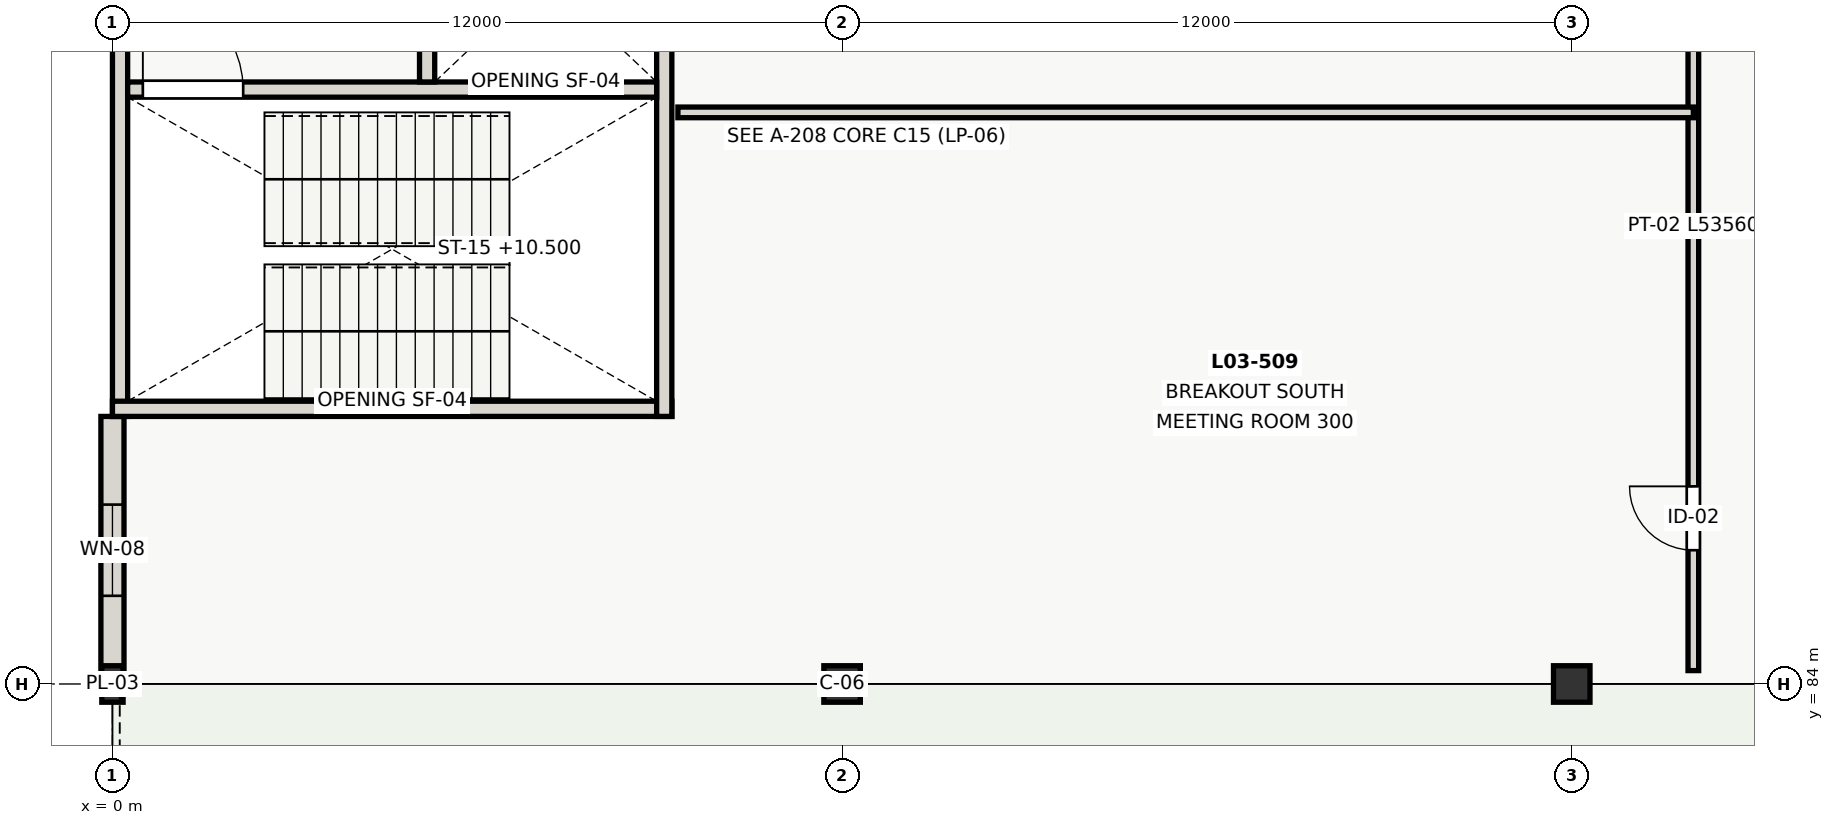
"""IFC4 building model, lengths in metres.
Left out: names, types, materials, properties, quantities, classifications, styles, units other than length and angle.
Written with IfcOpenShell. Run it as: python <this file> out.ifc"""

import sys

from ifc_helpers import new_model, si_unit, direction, frame, frame_2d, origin, origin_2d, place, context, subcontext, project, spatial, rectangle, extrude, element, fill, save


model = new_model("IFC4")
c1 = context("Model", 3, precision=1e-05, world=origin(), true_north=direction((0.0, 1.0)))
c2 = subcontext(c1, "Body", "Model", "MODEL_VIEW")
j1 = project(units=[si_unit("LENGTHUNIT", "METRE"), si_unit("PLANEANGLEUNIT", "RADIAN")], contexts=[c1])
p1 = place(None, origin())
s1 = spatial("IfcSite", under=j1, at=p1, CompositionType="ELEMENT")
p2 = place(p1, origin())
s2 = spatial("IfcBuilding", under=s1, at=p2, CompositionType="ELEMENT")
p3 = place(p2, frame((0.0, 0.0, 8.4)))
s3 = spatial("IfcBuildingStorey", under=s2, at=p3, CompositionType="ELEMENT", Elevation=8.4)
p4 = place(p3, frame((0.0, 84.0, 0.0), z_axis=(0.0, 0.0, 1.0), x_axis=(1.0, 0.0, 0.0)))
e1 = element("IfcColumn", 1, at=p4, inside=s3, PredefinedType="PILASTER", context=c2, shape_type="SweptSolid", body=[
    extrude(rectangle(XDim=0.35, YDim=0.6, at=origin_2d()), origin(), (0.0, 0.0, 1.0), 4.2),
])
for number, where, z_axis, x_axis in (
    (2, (12.0, 84.0, 0.0), (0.0, 0.0, 1.0), (1.0, 0.0, 0.0)),
    (3, (24.0, 84.0, 0.0), (0.0, 0.0, 1.0), (1.0, 0.0, 0.0)),
):
    element("IfcColumn", number, at=place(p3, frame(where, z_axis=z_axis, x_axis=x_axis)), inside=s3, PredefinedType="COLUMN", context=c2, shape_type="SweptSolid", body=[
        extrude(rectangle(XDim=0.6, YDim=0.6, at=origin_2d()), origin(), (0.0, 0.0, 1.0), 4.2),
    ])
p5 = place(p3, frame((0.0, 84.0, 0.0), z_axis=(0.0, 0.0, 1.0), x_axis=(0.0, 1.0, 0.0)))
e4 = element("IfcWall", 4, at=p5, inside=s3, PredefinedType="SOLIDWALL", context=c2, shape_type="SweptSolid", body=[
    extrude(rectangle(XDim=4.4, YDim=0.38, at=frame_2d((2.2, 0.0))), origin(), (0.0, 0.0, 1.0), 3.36),
])
p6 = place(p5, frame((1.45, 0.0, 0.9)))
e5 = element("IfcOpeningElement", 5, at=p6, cuts=e4, PredefinedType="OPENING", context=c2, shape_type="SweptSolid", body=[
    extrude(rectangle(XDim=1.5, YDim=1.95, at=frame_2d((0.75, 0.975))), frame((0.0, 0.2, 0.0), z_axis=(0.0, -1.0, 0.0), x_axis=(1.0, 0.0, 0.0)), (0.0, 0.0, 1.0), 0.4),
])
p7 = place(p3, frame((0.125, 88.4, 0.0), z_axis=(0.0, 0.0, 1.0), x_axis=(0.0, 1.0, 0.0)))
e6 = element("IfcWall", 6, at=p7, inside=s3, PredefinedType="SHEAR", context=c2, shape_type="SweptSolid", body=[
    extrude(rectangle(XDim=9.2, YDim=0.25, at=frame_2d((4.6, 0.0))), origin(), (0.0, 0.0, 1.0), 4.2),
])
p8 = place(p3, frame((0.0, 88.525, 0.0), z_axis=(0.0, 0.0, 1.0), x_axis=(1.0, 0.0, 0.0)))
e7 = element("IfcWall", 7, at=p8, inside=s3, PredefinedType="SHEAR", context=c2, shape_type="SweptSolid", body=[
    extrude(rectangle(XDim=9.2, YDim=0.25, at=frame_2d((4.6, 0.0))), origin(), (0.0, 0.0, 1.0), 4.2),
])
p9 = place(p3, frame((9.075, 88.4, 0.0), z_axis=(0.0, 0.0, 1.0), x_axis=(0.0, 1.0, 0.0)))
e8 = element("IfcWall", 8, at=p9, inside=s3, PredefinedType="SHEAR", context=c2, shape_type="SweptSolid", body=[
    extrude(rectangle(XDim=9.2, YDim=0.25, at=frame_2d((4.6, 0.0))), origin(), (0.0, 0.0, 1.0), 4.2),
])
p10 = place(p3, frame((0.25, 93.775, 0.0), z_axis=(0.0, 0.0, 1.0), x_axis=(1.0, 0.0, 0.0)))
e9 = element("IfcWall", 9, at=p10, inside=s3, PredefinedType="SHEAR", context=c2, shape_type="SweptSolid", body=[
    extrude(rectangle(XDim=8.7, YDim=0.25, at=frame_2d((4.35, 0.0))), origin(), (0.0, 0.0, 1.0), 4.2),
])
p11 = place(p10, frame((0.25, 0.0, 0.0)))
e10 = element("IfcOpeningElement", 10, at=p11, cuts=e9, PredefinedType="OPENING", context=c2, shape_type="SweptSolid", body=[
    extrude(rectangle(XDim=1.65, YDim=2.1, at=frame_2d((0.825, 1.05))), frame((0.0, 0.135, 0.0), z_axis=(0.0, -1.0, 0.0), x_axis=(1.0, 0.0, 0.0)), (0.0, 0.0, 1.0), 0.27),
])
p12 = place(p3, frame((5.175, 93.9, 0.0), z_axis=(0.0, 0.0, 1.0), x_axis=(0.0, 1.0, 0.0)))
e11 = element("IfcWall", 11, at=p12, inside=s3, PredefinedType="SHEAR", context=c2, shape_type="SweptSolid", body=[
    extrude(rectangle(XDim=3.45, YDim=0.25, at=frame_2d((1.725, 0.0))), origin(), (0.0, 0.0, 1.0), 4.2),
])
p13 = place(p12, frame((1.175, 0.0, 0.0)))
e12 = element("IfcOpeningElement", 12, at=p13, cuts=e11, PredefinedType="OPENING", context=c2, shape_type="SweptSolid", body=[
    extrude(rectangle(XDim=1.1, YDim=2.1, at=frame_2d((0.55, 1.05))), frame((0.0, 0.135, 0.0), z_axis=(0.0, -1.0, 0.0), x_axis=(1.0, 0.0, 0.0)), (0.0, 0.0, 1.0), 0.27),
])
p14 = place(p3, frame((26.0, 84.22, 0.0), z_axis=(0.0, 0.0, 1.0), x_axis=(0.0, 1.0, 0.0)))
e13 = element("IfcWall", 13, at=p14, inside=s3, PredefinedType="PARTITIONING", context=c2, shape_type="SweptSolid", body=[
    extrude(rectangle(XDim=53.56, YDim=0.175, at=frame_2d((26.78, 0.0))), origin(), (0.0, 0.0, 1.0), 3.75),
])
p15 = place(p14, frame((1.98, 0.0, 0.0)))
e14 = element("IfcOpeningElement", 14, at=p15, cuts=e13, PredefinedType="OPENING", context=c2, shape_type="SweptSolid", body=[
    extrude(rectangle(XDim=1.05, YDim=2.1, at=frame_2d((0.525, 1.05))), frame((0.0, 0.097, 0.0), z_axis=(0.0, -1.0, 0.0), x_axis=(1.0, 0.0, 0.0)), (0.0, 0.0, 1.0), 0.195),
])
p16 = place(p14, frame((10.28, 0.0, 0.0)))
e15 = element("IfcOpeningElement", 15, at=p16, cuts=e13, PredefinedType="OPENING", context=c2, shape_type="SweptSolid", body=[
    extrude(rectangle(XDim=1.8, YDim=2.15, at=frame_2d((0.9, 1.075))), frame((0.0, 0.097, 0.0), z_axis=(0.0, -1.0, 0.0), x_axis=(1.0, 0.0, 0.0)), (0.0, 0.0, 1.0), 0.195),
])
p17 = place(p14, frame((14.58, 0.0, 0.0)))
e16 = element("IfcOpeningElement", 16, at=p17, cuts=e13, PredefinedType="OPENING", context=c2, shape_type="SweptSolid", body=[
    extrude(rectangle(XDim=1.05, YDim=2.1, at=frame_2d((0.525, 1.05))), frame((0.0, 0.097, 0.0), z_axis=(0.0, -1.0, 0.0), x_axis=(1.0, 0.0, 0.0)), (0.0, 0.0, 1.0), 0.195),
])
p18 = place(p14, frame((25.78, 0.0, 0.0)))
e17 = element("IfcOpeningElement", 17, at=p18, cuts=e13, PredefinedType="OPENING", context=c2, shape_type="SweptSolid", body=[
    extrude(rectangle(XDim=1.05, YDim=2.1, at=frame_2d((0.525, 1.05))), frame((0.0, 0.097, 0.0), z_axis=(0.0, -1.0, 0.0), x_axis=(1.0, 0.0, 0.0)), (0.0, 0.0, 1.0), 0.195),
])
p19 = place(p14, frame((37.98, 0.0, 0.0)))
e18 = element("IfcOpeningElement", 18, at=p19, cuts=e13, PredefinedType="OPENING", context=c2, shape_type="SweptSolid", body=[
    extrude(rectangle(XDim=1.0, YDim=2.1, at=frame_2d((0.5, 1.05))), frame((0.0, 0.097, 0.0), z_axis=(0.0, -1.0, 0.0), x_axis=(1.0, 0.0, 0.0)), (0.0, 0.0, 1.0), 0.195),
])
p20 = place(p14, frame((47.28, 0.0, 0.0)))
e19 = element("IfcOpeningElement", 19, at=p20, cuts=e13, PredefinedType="OPENING", context=c2, shape_type="SweptSolid", body=[
    extrude(rectangle(XDim=0.98, YDim=2.1, at=frame_2d((0.49, 1.05))), frame((0.0, 0.097, 0.0), z_axis=(0.0, -1.0, 0.0), x_axis=(1.0, 0.0, 0.0)), (0.0, 0.0, 1.0), 0.195),
])
p21 = place(p3, frame((9.3, 93.4, 0.0), z_axis=(0.0, 0.0, 1.0), x_axis=(1.0, 0.0, 0.0)))
e20 = element("IfcWall", 20, at=p21, inside=s3, PredefinedType="PARTITIONING", context=c2, shape_type="SweptSolid", body=[
    extrude(rectangle(XDim=16.7, YDim=0.175, at=frame_2d((8.35, 0.0))), origin(), (0.0, 0.0, 1.0), 3.75),
])
p22 = place(p6, origin())
e21 = element("IfcWindow", 21, at=p22, inside=s3, PartitioningType="SINGLE_PANEL", PredefinedType="WINDOW", context=c2, shape_type="SweptSolid", body=[
    extrude(rectangle(XDim=1.5, YDim=1.95, at=frame_2d((0.75, 0.975))), frame((0.0, 0.03, 0.0), z_axis=(0.0, -1.0, 0.0), x_axis=(1.0, 0.0, 0.0)), (0.0, 0.0, 1.0), 0.06),
])
fill(e5, e21)
p23 = place(p11, origin())
e22 = element("IfcDoor", 22, at=p23, inside=s3, OperationType="SINGLE_SWING_LEFT", PredefinedType="DOOR", context=c2, shape_type="SweptSolid", body=[
    extrude(rectangle(XDim=1.65, YDim=2.1, at=frame_2d((0.825, 1.05))), frame((0.0, 0.025, 0.0), z_axis=(0.0, -1.0, 0.0), x_axis=(1.0, 0.0, 0.0)), (0.0, 0.0, 1.0), 0.05),
])
fill(e10, e22)
p24 = place(p15, origin())
e23 = element("IfcDoor", 23, at=p24, inside=s3, OperationType="SINGLE_SWING_RIGHT", PredefinedType="DOOR", context=c2, shape_type="SweptSolid", body=[
    extrude(rectangle(XDim=1.05, YDim=2.1, at=frame_2d((0.525, 1.05))), frame((0.0, 0.025, 0.0), z_axis=(0.0, -1.0, 0.0), x_axis=(1.0, 0.0, 0.0)), (0.0, 0.0, 1.0), 0.05),
])
fill(e14, e23)
save(model, sys.argv[1])
